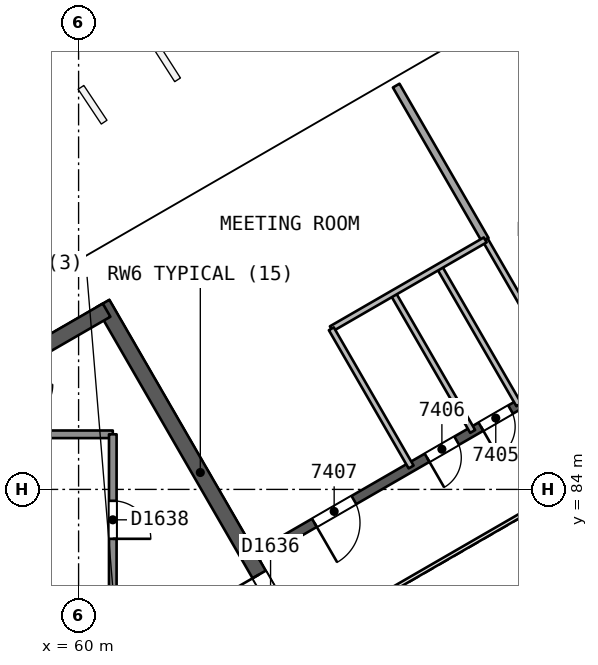
"""IFC4 building model, lengths in metres.
Left out: names, types, materials, properties, quantities, classifications, styles, units other than length and angle.
Written with IfcOpenShell. Run it as: python <this file> out.ifc"""

import sys

from ifc_helpers import new_model, si_unit, direction, frame, frame_2d, origin, origin_2d, place, context, subcontext, project, spatial, rectangle, extrude, element, fill, save


model = new_model("IFC4")
c1 = context("Model", 3, precision=1e-05, world=origin(), true_north=direction((0.0, 1.0)))
c2 = subcontext(c1, "Body", "Model", "MODEL_VIEW")
j1 = project(units=[si_unit("LENGTHUNIT", "METRE"), si_unit("PLANEANGLEUNIT", "RADIAN")], contexts=[c1])
p1 = place(None, origin())
s1 = spatial("IfcSite", under=j1, at=p1, CompositionType="ELEMENT")
p2 = place(p1, origin())
s2 = spatial("IfcBuilding", under=s1, at=p2, CompositionType="ELEMENT")
p3 = place(p2, frame((0.0, 0.0, 300.4)))
s3 = spatial("IfcBuildingStorey", under=s2, at=p3, CompositionType="ELEMENT", Elevation=300.4)
p4 = place(p3, frame((65.769, 80.0, 0.0), z_axis=(0.0, 0.0, 1.0), x_axis=(-0.50000177223, 0.866024380585, 0.0)))
e1 = element("IfcWall", 1, at=p4, inside=s3, PredefinedType="SHEAR", context=c2, shape_type="SweptSolid", body=[
    extrude(rectangle(XDim=10.265, YDim=0.4, at=frame_2d((5.132, 0.0))), origin(), (0.0, 0.0, 1.0), 4.4),
])
p5 = place(p4, frame((0.834, 0.0, 0.0)))
e2 = element("IfcOpeningElement", 2, at=p5, cuts=e1, PredefinedType="OPENING", context=c2, shape_type="SweptSolid", body=[
    extrude(rectangle(XDim=1.2, YDim=2.1, at=frame_2d((0.6, 1.05))), frame((0.0, 0.21, 0.0), z_axis=(0.0, -1.0, 0.0), x_axis=(1.0, 0.0, 0.0)), (0.0, 0.0, 1.0), 0.421),
])
p6 = place(p3, frame((60.737, 88.716, 0.0), z_axis=(0.0, 0.0, 1.0), x_axis=(-0.866028812667, -0.499994095595, 0.0)))
e3 = element("IfcWall", 3, at=p6, inside=s3, PredefinedType="SHEAR", context=c2, shape_type="SweptSolid", body=[
    extrude(rectangle(XDim=14.134, YDim=0.4, at=frame_2d((7.067, 0.0))), origin(), (0.0, 0.0, 1.0), 4.4),
])
p7 = place(p3, frame((78.2, 90.046, 0.0), z_axis=(0.0, 0.0, 1.0), x_axis=(-0.866026492143, -0.499998114903, 0.0)))
e4 = element("IfcWall", 4, at=p7, inside=s3, PredefinedType="SHEAR", context=c2, shape_type="SweptSolid", body=[
    extrude(rectangle(XDim=15.588, YDim=0.25, at=frame_2d((7.794, 0.0))), origin(), (0.0, 0.0, 1.0), 4.0),
])
p8 = place(p7, frame((2.518, 0.0, 0.0)))
e5 = element("IfcOpeningElement", 5, at=p8, cuts=e4, PredefinedType="OPENING", context=c2, shape_type="SweptSolid", body=[
    extrude(rectangle(XDim=1.2, YDim=2.4, at=frame_2d((0.6, 1.2))), frame((0.0, 0.135, 0.0), z_axis=(0.0, -1.0, 0.0), x_axis=(1.0, 0.0, 0.0)), (0.0, 0.0, 1.0), 0.271),
])
p9 = place(p7, frame((6.487, 0.0, 0.0)))
e6 = element("IfcOpeningElement", 6, at=p9, cuts=e4, PredefinedType="OPENING", context=c2, shape_type="SweptSolid", body=[
    extrude(rectangle(XDim=0.9, YDim=2.1, at=frame_2d((0.45, 1.05))), frame((0.0, 0.135, 0.0), z_axis=(0.0, -1.0, 0.0), x_axis=(1.0, 0.0, 0.0)), (0.0, 0.0, 1.0), 0.271),
])
p10 = place(p7, frame((7.89, 0.0, 0.0)))
e7 = element("IfcOpeningElement", 7, at=p10, cuts=e4, PredefinedType="OPENING", context=c2, shape_type="SweptSolid", body=[
    extrude(rectangle(XDim=0.9, YDim=2.1, at=frame_2d((0.45, 1.05))), frame((0.0, 0.135, 0.0), z_axis=(0.0, -1.0, 0.0), x_axis=(1.0, 0.0, 0.0)), (0.0, 0.0, 1.0), 0.271),
])
p11 = place(p7, frame((9.527, 0.0, 0.0)))
e8 = element("IfcOpeningElement", 8, at=p11, cuts=e4, PredefinedType="OPENING", context=c2, shape_type="SweptSolid", body=[
    extrude(rectangle(XDim=0.9, YDim=2.1, at=frame_2d((0.45, 1.05))), frame((0.0, 0.135, 0.0), z_axis=(0.0, -1.0, 0.0), x_axis=(1.0, 0.0, 0.0)), (0.0, 0.0, 1.0), 0.271),
])
p12 = place(p7, frame((12.65, 0.0, 0.0)))
e9 = element("IfcOpeningElement", 9, at=p12, cuts=e4, PredefinedType="OPENING", context=c2, shape_type="SweptSolid", body=[
    extrude(rectangle(XDim=1.2, YDim=2.4, at=frame_2d((0.6, 1.2))), frame((0.0, 0.135, 0.0), z_axis=(0.0, -1.0, 0.0), x_axis=(1.0, 0.0, 0.0)), (0.0, 0.0, 1.0), 0.271),
])
p13 = place(p3, frame((65.705, 96.1, 0.0), z_axis=(0.010096151254, -0.017474107939, 0.999796340902), x_axis=(-0.500171963961, 0.865690897347, 0.020181098047)))
e10 = element("IfcColumn", 10, at=p13, inside=s3, PredefinedType="COLUMN", context=c2, shape_type="SweptSolid", body=[
    extrude(rectangle(XDim=0.8, YDim=0.8, at=origin_2d()), origin(), (0.0, 0.0, 1.0), 4.401),
])
p14 = place(p3, frame((70.7, 90.565, 0.0), z_axis=(0.0, 0.0, 1.0), x_axis=(0.500027713859, -0.866009402589, 0.0)))
e11 = element("IfcWall", 11, at=p14, inside=s3, PredefinedType="PARTITIONING", context=c2, shape_type="SweptSolid", body=[
    extrude(rectangle(XDim=4.2, YDim=0.15, at=frame_2d((2.1, 0.0))), origin(), (0.0, 0.0, 1.0), 4.0),
])
p15 = place(p3, frame((68.357, 94.625, 0.0), z_axis=(0.0, 0.0, 1.0), x_axis=(0.499999000853, -0.866025980642, 0.0)))
e12 = element("IfcWall", 12, at=p15, inside=s3, PredefinedType="PARTITIONING", context=c2, shape_type="SweptSolid", body=[
    extrude(rectangle(XDim=4.687, YDim=0.2, at=frame_2d((2.344, 0.0))), origin(), (0.0, 0.0, 1.0), 4.0),
])
p16 = place(p3, frame((69.485, 89.864, 0.0), z_axis=(0.0, 0.0, 1.0), x_axis=(0.49998411664, -0.866034573852, 0.0)))
e13 = element("IfcWall", 13, at=p16, inside=s3, PredefinedType="PARTITIONING", context=c2, shape_type="SweptSolid", body=[
    extrude(rectangle(XDim=4.2, YDim=0.15, at=frame_2d((2.1, 0.0))), origin(), (0.0, 0.0, 1.0), 4.0),
])
p17 = place(p3, frame((68.27, 89.163, 0.0), z_axis=(0.0, 0.0, 1.0), x_axis=(0.500002543286, -0.866023935413, 0.0)))
e14 = element("IfcWall", 14, at=p17, inside=s3, PredefinedType="PARTITIONING", context=c2, shape_type="SweptSolid", body=[
    extrude(rectangle(XDim=4.2, YDim=0.15, at=frame_2d((2.1, 0.0))), origin(), (0.0, 0.0, 1.0), 4.0),
])
p18 = place(p3, frame((70.7, 90.565, 0.0), z_axis=(0.0, 0.0, 1.0), x_axis=(-0.866017799667, -0.500013170487, 0.0)))
e15 = element("IfcWall", 15, at=p18, inside=s3, PredefinedType="PARTITIONING", context=c2, shape_type="SweptSolid", body=[
    extrude(rectangle(XDim=4.677, YDim=0.15, at=frame_2d((2.338, 0.0))), origin(), (0.0, 0.0, 1.0), 4.0),
])
p19 = place(p3, frame((66.65, 88.226, 0.0), z_axis=(0.0, 0.0, 1.0), x_axis=(0.500016035621, -0.866016145416, 0.0)))
e16 = element("IfcWall", 16, at=p19, inside=s3, PredefinedType="PARTITIONING", context=c2, shape_type="SweptSolid", body=[
    extrude(rectangle(XDim=4.199, YDim=0.15, at=frame_2d((2.1, 0.0))), origin(), (0.0, 0.0, 1.0), 4.0),
])
p20 = place(p3, frame((60.9, 85.45, 0.0), z_axis=(0.0, 0.0, 1.0), x_axis=(-1.0, 0.0, 0.0)))
e17 = element("IfcWall", 17, at=p20, inside=s3, PredefinedType="SOLIDWALL", context=c2, shape_type="SweptSolid", body=[
    extrude(rectangle(XDim=2.48, YDim=0.2, at=frame_2d((1.24, 0.0))), origin(), (0.0, 0.0, 1.0), 4.0),
])
p21 = place(p3, frame((60.9, 85.45, 0.0), z_axis=(0.0, 0.0, 1.0), x_axis=(0.0, -1.0, 0.0)))
e18 = element("IfcWall", 18, at=p21, inside=s3, PredefinedType="SOLIDWALL", context=c2, shape_type="SweptSolid", body=[
    extrude(rectangle(XDim=10.9, YDim=0.2, at=frame_2d((5.45, 0.0))), origin(), (0.0, 0.0, 1.0), 4.0),
])
p22 = place(p21, frame((1.75, 0.0, 0.0)))
e19 = element("IfcOpeningElement", 19, at=p22, cuts=e18, PredefinedType="OPENING", context=c2, shape_type="SweptSolid", body=[
    extrude(rectangle(XDim=1.0, YDim=2.1, at=frame_2d((0.5, 1.05))), frame((0.0, 0.11, 0.0), z_axis=(0.0, -1.0, 0.0), x_axis=(1.0, 0.0, 0.0)), (0.0, 0.0, 1.0), 0.221),
])
p23 = place(p21, frame((5.125, 0.0, 0.0)))
e20 = element("IfcOpeningElement", 20, at=p23, cuts=e18, PredefinedType="OPENING", context=c2, shape_type="SweptSolid", body=[
    extrude(rectangle(XDim=1.0, YDim=2.1, at=frame_2d((0.5, 1.05))), frame((0.0, 0.11, 0.0), z_axis=(0.0, -1.0, 0.0), x_axis=(1.0, 0.0, 0.0)), (0.0, 0.0, 1.0), 0.221),
])
p24 = place(p21, frame((7.375, 0.0, 0.0)))
e21 = element("IfcOpeningElement", 21, at=p24, cuts=e18, PredefinedType="OPENING", context=c2, shape_type="SweptSolid", body=[
    extrude(rectangle(XDim=1.0, YDim=2.1, at=frame_2d((0.5, 1.05))), frame((0.0, 0.11, 0.0), z_axis=(0.0, -1.0, 0.0), x_axis=(1.0, 0.0, 0.0)), (0.0, 0.0, 1.0), 0.221),
])
p25 = place(p3, frame((77.738, 86.846, 0.0), z_axis=(0.0, 0.0, 1.0), x_axis=(-0.866026658274, -0.499997827154, 0.0)))
e22 = element("IfcWall", 22, at=p25, inside=s3, PredefinedType="PARTITIONING", context=c2, shape_type="SweptSolid", body=[
    extrude(rectangle(XDim=11.588, YDim=0.1, at=frame_2d((5.794, 0.0))), origin(), (0.0, 0.0, 1.0), 4.0),
])
p26 = place(p10, origin())
e23 = element("IfcDoor", 23, at=p26, inside=s3, OperationType="SINGLE_SWING_RIGHT", PredefinedType="NOTDEFINED", context=c2, shape_type="SweptSolid", body=[
    extrude(rectangle(XDim=0.9, YDim=2.1, at=frame_2d((0.45, 1.05))), frame((0.0, 0.025, 0.0), z_axis=(0.0, -1.0, 0.0), x_axis=(1.0, 0.0, 0.0)), (0.0, 0.0, 1.0), 0.05),
])
fill(e7, e23)
p27 = place(p11, origin())
e24 = element("IfcDoor", 24, at=p27, inside=s3, OperationType="SINGLE_SWING_RIGHT", PredefinedType="NOTDEFINED", context=c2, shape_type="SweptSolid", body=[
    extrude(rectangle(XDim=0.9, YDim=2.1, at=frame_2d((0.45, 1.05))), frame((0.0, 0.025, 0.0), z_axis=(0.0, -1.0, 0.0), x_axis=(1.0, 0.0, 0.0)), (0.0, 0.0, 1.0), 0.05),
])
fill(e8, e24)
p28 = place(p12, origin())
e25 = element("IfcDoor", 25, at=p28, inside=s3, OperationType="SINGLE_SWING_RIGHT", PredefinedType="NOTDEFINED", context=c2, shape_type="SweptSolid", body=[
    extrude(rectangle(XDim=1.2, YDim=2.4, at=frame_2d((0.6, 1.2))), frame((0.0, 0.025, 0.0), z_axis=(0.0, -1.0, 0.0), x_axis=(1.0, 0.0, 0.0)), (0.0, 0.0, 1.0), 0.05),
])
fill(e9, e25)
p29 = place(p5, origin())
e26 = element("IfcDoor", 26, at=p29, inside=s3, OperationType="SINGLE_SWING_RIGHT", PredefinedType="NOTDEFINED", context=c2, shape_type="SweptSolid", body=[
    extrude(rectangle(XDim=1.2, YDim=2.1, at=frame_2d((0.6, 1.05))), frame((0.0, 0.025, 0.0), z_axis=(0.0, -1.0, 0.0), x_axis=(1.0, 0.0, 0.0)), (0.0, 0.0, 1.0), 0.05),
])
fill(e2, e26)
p30 = place(p22, origin())
e27 = element("IfcDoor", 27, at=p30, inside=s3, OperationType="SINGLE_SWING_RIGHT", PredefinedType="NOTDEFINED", context=c2, shape_type="SweptSolid", body=[
    extrude(rectangle(XDim=1.0, YDim=2.1, at=frame_2d((0.5, 1.05))), frame((0.0, 0.025, 0.0), z_axis=(0.0, -1.0, 0.0), x_axis=(1.0, 0.0, 0.0)), (0.0, 0.0, 1.0), 0.05),
])
fill(e19, e27)
save(model, sys.argv[1])
